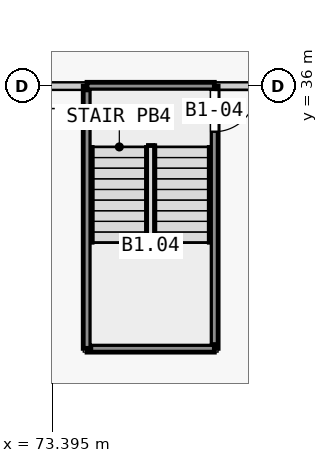
"""IFC4 building model, lengths in metres.
Left out: names, types, materials, properties, quantities, classifications, styles, units other than length and angle.
Written with IfcOpenShell. Run it as: python <this file> out.ifc"""

import sys

from ifc_helpers import new_model, si_unit, direction, frame, frame_2d, origin, place, context, subcontext, project, spatial, rectangle, extrude, element, fill, save


model = new_model("IFC4")
c1 = context("Model", 3, precision=1e-05, world=origin(), true_north=direction((0.0, 1.0)))
c2 = subcontext(c1, "Body", "Model", "MODEL_VIEW")
j1 = project(units=[si_unit("LENGTHUNIT", "METRE"), si_unit("PLANEANGLEUNIT", "RADIAN")], contexts=[c1])
p1 = place(None, origin())
s1 = spatial("IfcSite", under=j1, at=p1, CompositionType="ELEMENT")
p2 = place(p1, origin())
s2 = spatial("IfcBuilding", under=s1, at=p2, CompositionType="ELEMENT")
p3 = place(p2, frame((0.0, 0.0, -7.0)))
s3 = spatial("IfcBuildingStorey", under=s2, at=p3, CompositionType="ELEMENT", Elevation=-7.0)
p4 = place(p3, frame((74.3, 36.0, 0.0), z_axis=(0.0, 0.0, 1.0), x_axis=(-1.0, 0.0, 0.0)))
e1 = element("IfcWall", 1, at=p4, inside=s3, PredefinedType="PARTITIONING", context=c2, shape_type="SweptSolid", body=[
    extrude(rectangle(XDim=1.7, YDim=0.2, at=frame_2d((0.85, 0.0))), origin(), (0.0, 0.0, 1.0), 6.55),
])
p5 = place(p3, frame((80.4, 36.0, 0.0), z_axis=(0.0, 0.0, 1.0), x_axis=(-1.0, 0.0, 0.0)))
e2 = element("IfcWall", 2, at=p5, inside=s3, PredefinedType="PARTITIONING", context=c2, shape_type="SweptSolid", body=[
    extrude(rectangle(XDim=2.75, YDim=0.2, at=frame_2d((1.375, 0.0))), origin(), (0.0, 0.0, 1.0), 6.55),
])
p6 = place(p3, frame((77.65, 36.0, 0.0), z_axis=(0.0, 0.0, 1.0), x_axis=(0.0, -1.0, 0.0)))
e3 = element("IfcWall", 3, at=p6, inside=s3, PredefinedType="PARTITIONING", context=c2, shape_type="SweptSolid", body=[
    extrude(rectangle(XDim=6.9, YDim=0.2, at=frame_2d((3.45, 0.0))), origin(), (0.0, 0.0, 1.0), 6.55),
])
p7 = place(p6, frame((0.1, 0.0, 0.0)))
e4 = element("IfcOpeningElement", 4, at=p7, cuts=e3, PredefinedType="OPENING", context=c2, shape_type="SweptSolid", body=[
    extrude(rectangle(XDim=1.1, YDim=2.1, at=frame_2d((0.55, 1.05))), frame((0.0, 0.11, 0.0), z_axis=(0.0, -1.0, 0.0), x_axis=(1.0, 0.0, 0.0)), (0.0, 0.0, 1.0), 0.22),
])
p8 = place(p3, frame((77.65, 29.1, 0.0), z_axis=(0.0, 0.0, 1.0), x_axis=(-1.0, 0.0, 0.0)))
e5 = element("IfcWall", 5, at=p8, inside=s3, PredefinedType="PARTITIONING", context=c2, shape_type="SweptSolid", body=[
    extrude(rectangle(XDim=3.35, YDim=0.2, at=frame_2d((1.675, 0.0))), origin(), (0.0, 0.0, 1.0), 6.55),
])
p9 = place(p3, frame((74.3, 29.1, 0.0), z_axis=(0.0, 0.0, 1.0), x_axis=(0.0, 1.0, 0.0)))
e6 = element("IfcWall", 6, at=p9, inside=s3, PredefinedType="PARTITIONING", context=c2, shape_type="SweptSolid", body=[
    extrude(rectangle(XDim=6.9, YDim=0.2, at=frame_2d((3.45, 0.0))), origin(), (0.0, 0.0, 1.0), 6.55),
])
p10 = place(p3, frame((74.3, 36.0, 0.0), z_axis=(0.0, 0.0, 1.0), x_axis=(1.0, 0.0, 0.0)))
e7 = element("IfcWall", 7, at=p10, inside=s3, PredefinedType="PARTITIONING", context=c2, shape_type="SweptSolid", body=[
    extrude(rectangle(XDim=3.35, YDim=0.2, at=frame_2d((1.675, 0.0))), origin(), (0.0, 0.0, 1.0), 6.55),
])
p11 = place(p7, origin())
e8 = element("IfcDoor", 8, at=p11, inside=s3, OperationType="SINGLE_SWING_LEFT", PredefinedType="DOOR", context=c2, shape_type="SweptSolid", body=[
    extrude(rectangle(XDim=1.1, YDim=2.1, at=frame_2d((0.55, 1.05))), frame((0.0, 0.025, 0.0), z_axis=(0.0, -1.0, 0.0), x_axis=(1.0, 0.0, 0.0)), (0.0, 0.0, 1.0), 0.05),
])
fill(e4, e8)
save(model, sys.argv[1])
